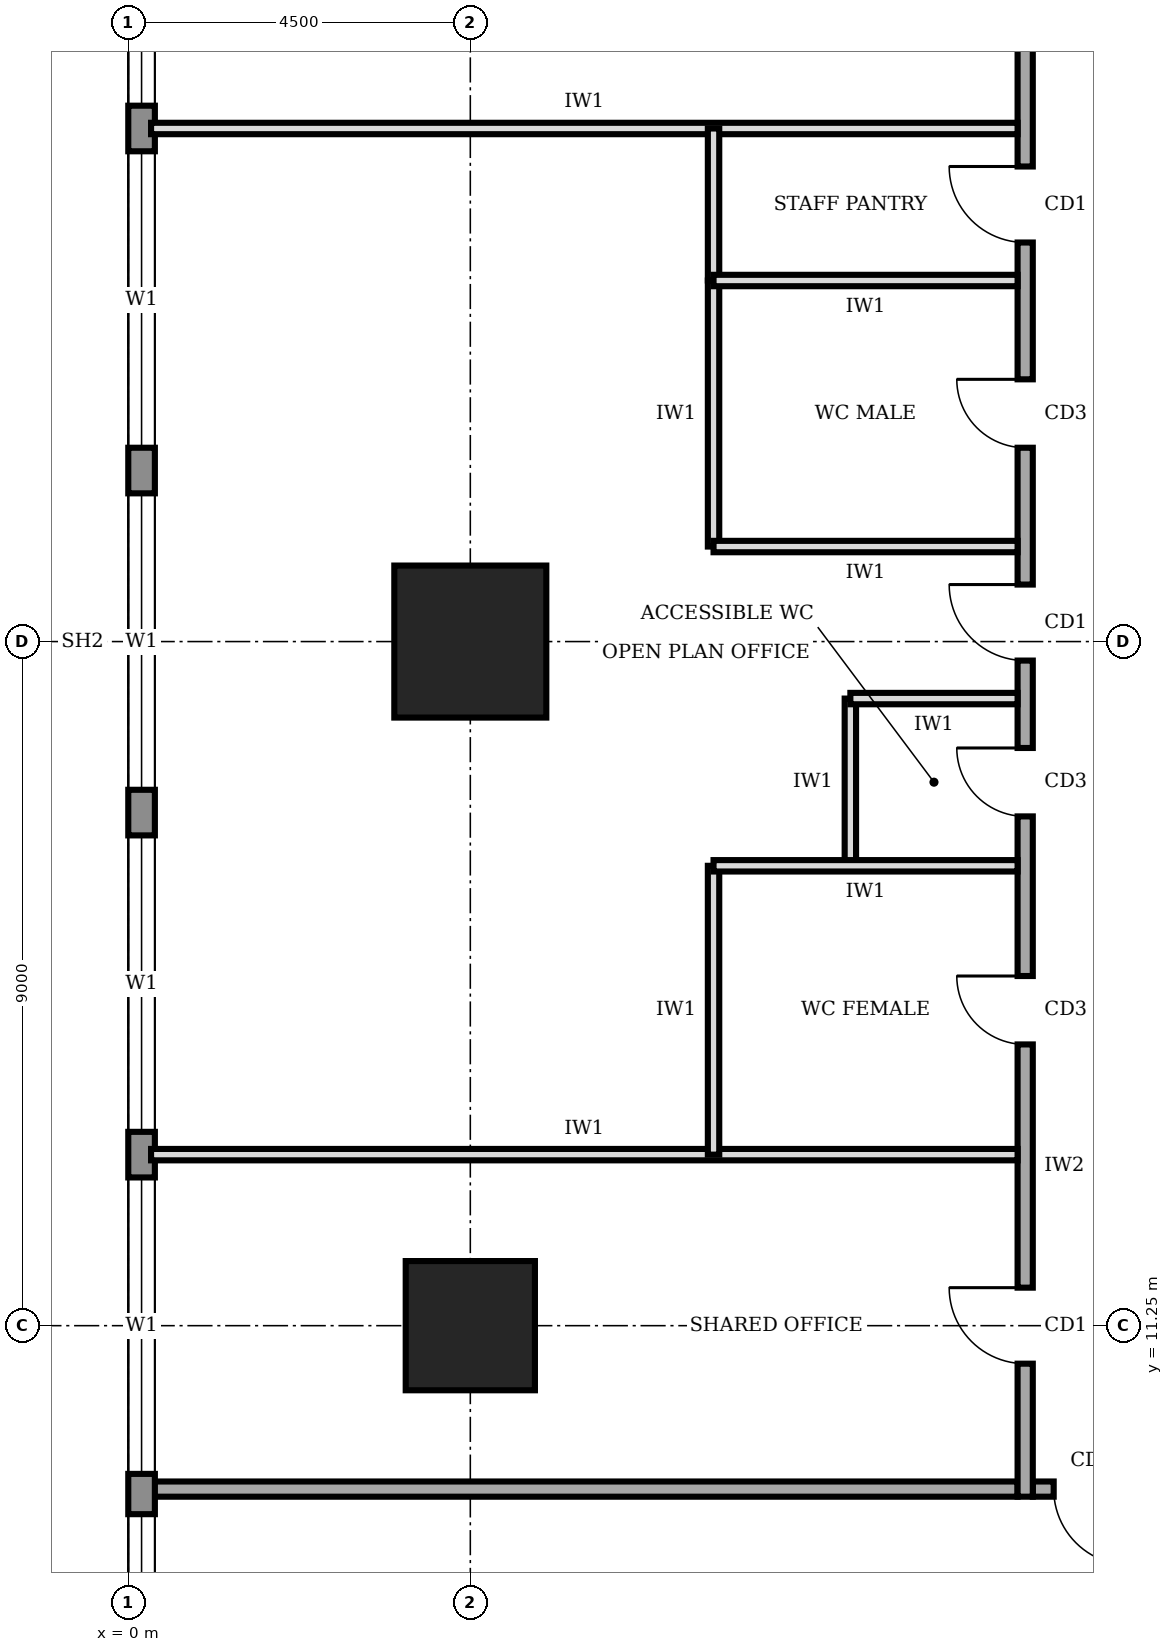
"""IFC4 building model, lengths in metres.
Left out: names, types, materials, properties, quantities, classifications, styles, units other than length and angle.
Written with IfcOpenShell. Run it as: python <this file> out.ifc"""

import sys

from ifc_helpers import new_model, si_unit, direction, frame, frame_2d, origin, origin_2d, place, context, subcontext, project, spatial, rectangle, extrude, element, fill, save


model = new_model("IFC4")
c1 = context("Model", 3, precision=1e-05, world=origin(), true_north=direction((0.0, 1.0)))
c2 = subcontext(c1, "Body", "Model", "MODEL_VIEW")
j1 = project(units=[si_unit("LENGTHUNIT", "METRE"), si_unit("PLANEANGLEUNIT", "RADIAN")], contexts=[c1])
p1 = place(None, origin())
s1 = spatial("IfcSite", under=j1, at=p1, CompositionType="ELEMENT")
p2 = place(p1, origin())
s2 = spatial("IfcBuilding", under=s1, at=p2, CompositionType="ELEMENT")
p3 = place(p2, frame((0.0, 0.0, 273.0)))
s3 = spatial("IfcBuildingStorey", under=s2, at=p3, CompositionType="ELEMENT", Elevation=273.0)
p4 = place(p3, frame((4.5, 11.25, 0.0), z_axis=(0.0, 0.0, 1.0), x_axis=(1.0, 0.0, 0.0)))
e1 = element("IfcColumn", 1, at=p4, inside=s3, PredefinedType="COLUMN", context=c2, shape_type="SweptSolid", body=[
    extrude(rectangle(XDim=1.7, YDim=1.7, at=origin_2d()), origin(), (0.0, 0.0, 1.0), 4.0),
])
p5 = place(p3, frame((4.5, 20.25, 0.0), z_axis=(0.0, 0.0, 1.0), x_axis=(1.0, 0.0, 0.0)))
e2 = element("IfcColumn", 2, at=p5, inside=s3, PredefinedType="COLUMN", context=c2, shape_type="SweptSolid", body=[
    extrude(rectangle(XDim=2.0, YDim=2.0, at=origin_2d()), origin(), (0.0, 0.0, 1.0), 4.0),
])
p6 = place(p3, frame((0.175, 35.98, 0.0), z_axis=(0.0, 0.0, 1.0), x_axis=(0.0, -1.0, 0.0)))
e3 = element("IfcWall", 3, at=p6, inside=s3, PredefinedType="STANDARD", context=c2, shape_type="SweptSolid", body=[
    extrude(rectangle(XDim=31.46, YDim=0.35, at=frame_2d((15.73, 0.0))), origin(), (0.0, 0.0, 1.0), 3.75),
])
p7 = place(p6, frame((27.21, 0.0, 0.9)))
e4 = element("IfcOpeningElement", 4, at=p7, cuts=e3, PredefinedType="OPENING", context=c2, shape_type="SweptSolid", body=[
    extrude(rectangle(XDim=3.9, YDim=2.2, at=frame_2d((1.95, 1.1))), frame((0.0, 0.185, 0.0), z_axis=(0.0, -1.0, 0.0), x_axis=(1.0, 0.0, 0.0)), (0.0, 0.0, 1.0), 0.37),
])
p8 = place(p6, frame((22.78, 0.0, 0.9)))
e5 = element("IfcOpeningElement", 5, at=p8, cuts=e3, PredefinedType="OPENING", context=c2, shape_type="SweptSolid", body=[
    extrude(rectangle(XDim=3.9, YDim=2.2, at=frame_2d((1.95, 1.1))), frame((0.0, 0.185, 0.0), z_axis=(0.0, -1.0, 0.0), x_axis=(1.0, 0.0, 0.0)), (0.0, 0.0, 1.0), 0.37),
])
p9 = place(p6, frame((18.28, 0.0, 0.9)))
e6 = element("IfcOpeningElement", 6, at=p9, cuts=e3, PredefinedType="OPENING", context=c2, shape_type="SweptSolid", body=[
    extrude(rectangle(XDim=3.9, YDim=2.2, at=frame_2d((1.95, 1.1))), frame((0.0, 0.185, 0.0), z_axis=(0.0, -1.0, 0.0), x_axis=(1.0, 0.0, 0.0)), (0.0, 0.0, 1.0), 0.37),
])
p10 = place(p6, frame((13.78, 0.0, 0.9)))
e7 = element("IfcOpeningElement", 7, at=p10, cuts=e3, PredefinedType="OPENING", context=c2, shape_type="SweptSolid", body=[
    extrude(rectangle(XDim=3.9, YDim=2.2, at=frame_2d((1.95, 1.1))), frame((0.0, 0.185, 0.0), z_axis=(0.0, -1.0, 0.0), x_axis=(1.0, 0.0, 0.0)), (0.0, 0.0, 1.0), 0.37),
])
p11 = place(p6, frame((9.28, 0.0, 0.9)))
e8 = element("IfcOpeningElement", 8, at=p11, cuts=e3, PredefinedType="OPENING", context=c2, shape_type="SweptSolid", body=[
    extrude(rectangle(XDim=3.9, YDim=2.2, at=frame_2d((1.95, 1.1))), frame((0.0, 0.185, 0.0), z_axis=(0.0, -1.0, 0.0), x_axis=(1.0, 0.0, 0.0)), (0.0, 0.0, 1.0), 0.37),
])
p12 = place(p6, frame((4.78, 0.0, 0.9)))
e9 = element("IfcOpeningElement", 9, at=p12, cuts=e3, PredefinedType="OPENING", context=c2, shape_type="SweptSolid", body=[
    extrude(rectangle(XDim=3.9, YDim=2.2, at=frame_2d((1.95, 1.1))), frame((0.0, 0.185, 0.0), z_axis=(0.0, -1.0, 0.0), x_axis=(1.0, 0.0, 0.0)), (0.0, 0.0, 1.0), 0.37),
])
p13 = place(p3, frame((11.9, 9.1, 0.0), z_axis=(0.0, 0.0, 1.0), x_axis=(1.0, 0.0, 0.0)))
e10 = element("IfcWall", 10, at=p13, inside=s3, PredefinedType="SOLIDWALL", context=c2, shape_type="SweptSolid", body=[
    extrude(rectangle(XDim=16.9, YDim=0.2, at=frame_2d((8.45, 0.0))), origin(), (0.0, 0.0, 1.0), 3.75),
])
p14 = place(p13, frame((0.275, 0.0, 0.0)))
e11 = element("IfcOpeningElement", 11, at=p14, cuts=e10, PredefinedType="OPENING", context=c2, shape_type="SweptSolid", body=[
    extrude(rectangle(XDim=1.0, YDim=2.1, at=frame_2d((0.5, 1.05))), frame((0.0, 0.11, 0.0), z_axis=(0.0, -1.0, 0.0), x_axis=(1.0, 0.0, 0.0)), (0.0, 0.0, 1.0), 0.22),
])
p15 = place(p13, frame((8.35, 0.0, 0.0)))
e12 = element("IfcOpeningElement", 12, at=p15, cuts=e10, PredefinedType="OPENING", context=c2, shape_type="SweptSolid", body=[
    extrude(rectangle(XDim=1.8, YDim=2.1, at=frame_2d((0.9, 1.05))), frame((0.0, 0.11, 0.0), z_axis=(0.0, -1.0, 0.0), x_axis=(1.0, 0.0, 0.0)), (0.0, 0.0, 1.0), 0.22),
])
p16 = place(p3, frame((11.8, 32.8, 0.0), z_axis=(0.0, 0.0, 1.0), x_axis=(0.0, -1.0, 0.0)))
e13 = element("IfcWall", 13, at=p16, inside=s3, PredefinedType="SOLIDWALL", context=c2, shape_type="SweptSolid", body=[
    extrude(rectangle(XDim=23.8, YDim=0.2, at=frame_2d((11.9, 0.0))), origin(), (0.0, 0.0, 1.0), 3.75),
])
p17 = place(p16, frame((21.05, 0.0, 0.0)))
e14 = element("IfcOpeningElement", 14, at=p17, cuts=e13, PredefinedType="OPENING", context=c2, shape_type="SweptSolid", body=[
    extrude(rectangle(XDim=1.0, YDim=2.1, at=frame_2d((0.5, 1.05))), frame((0.0, 0.11, 0.0), z_axis=(0.0, -1.0, 0.0), x_axis=(1.0, 0.0, 0.0)), (0.0, 0.0, 1.0), 0.22),
])
p18 = place(p16, frame((16.95, 0.0, 0.0)))
e15 = element("IfcOpeningElement", 15, at=p18, cuts=e13, PredefinedType="OPENING", context=c2, shape_type="SweptSolid", body=[
    extrude(rectangle(XDim=0.9, YDim=2.1, at=frame_2d((0.45, 1.05))), frame((0.0, 0.11, 0.0), z_axis=(0.0, -1.0, 0.0), x_axis=(1.0, 0.0, 0.0)), (0.0, 0.0, 1.0), 0.22),
])
p19 = place(p16, frame((13.95, 0.0, 0.0)))
e16 = element("IfcOpeningElement", 16, at=p19, cuts=e13, PredefinedType="OPENING", context=c2, shape_type="SweptSolid", body=[
    extrude(rectangle(XDim=0.9, YDim=2.1, at=frame_2d((0.45, 1.05))), frame((0.0, 0.11, 0.0), z_axis=(0.0, -1.0, 0.0), x_axis=(1.0, 0.0, 0.0)), (0.0, 0.0, 1.0), 0.22),
])
p20 = place(p16, frame((9.1, 0.0, 0.0)))
e17 = element("IfcOpeningElement", 17, at=p20, cuts=e13, PredefinedType="OPENING", context=c2, shape_type="SweptSolid", body=[
    extrude(rectangle(XDim=0.9, YDim=2.1, at=frame_2d((0.45, 1.05))), frame((0.0, 0.11, 0.0), z_axis=(0.0, -1.0, 0.0), x_axis=(1.0, 0.0, 0.0)), (0.0, 0.0, 1.0), 0.22),
])
p21 = place(p16, frame((6.3, 0.0, 0.0)))
e18 = element("IfcOpeningElement", 18, at=p21, cuts=e13, PredefinedType="OPENING", context=c2, shape_type="SweptSolid", body=[
    extrude(rectangle(XDim=1.0, YDim=2.1, at=frame_2d((0.5, 1.05))), frame((0.0, 0.11, 0.0), z_axis=(0.0, -1.0, 0.0), x_axis=(1.0, 0.0, 0.0)), (0.0, 0.0, 1.0), 0.22),
])
p22 = place(p16, frame((11.8, 0.0, 0.0)))
e19 = element("IfcOpeningElement", 19, at=p22, cuts=e13, PredefinedType="OPENING", context=c2, shape_type="SweptSolid", body=[
    extrude(rectangle(XDim=1.0, YDim=2.1, at=frame_2d((0.5, 1.05))), frame((0.0, 0.11, 0.0), z_axis=(0.0, -1.0, 0.0), x_axis=(1.0, 0.0, 0.0)), (0.0, 0.0, 1.0), 0.22),
])
p23 = place(p16, frame((2.3, 0.0, 0.0)))
e20 = element("IfcOpeningElement", 20, at=p23, cuts=e13, PredefinedType="OPENING", context=c2, shape_type="SweptSolid", body=[
    extrude(rectangle(XDim=1.0, YDim=2.1, at=frame_2d((0.5, 1.05))), frame((0.0, 0.11, 0.0), z_axis=(0.0, -1.0, 0.0), x_axis=(1.0, 0.0, 0.0)), (0.0, 0.0, 1.0), 0.22),
])
p24 = place(p3, frame((0.3, 9.1, 0.0), z_axis=(0.0, 0.0, 1.0), x_axis=(1.0, 0.0, 0.0)))
e21 = element("IfcWall", 21, at=p24, inside=s3, PredefinedType="SOLIDWALL", context=c2, shape_type="SweptSolid", body=[
    extrude(rectangle(XDim=11.4, YDim=0.2, at=frame_2d((5.7, 0.0))), origin(), (0.0, 0.0, 1.0), 3.75),
])
for number, where, z_axis, x_axis in (
    (22, (0.3, 13.5, 0.0), (0.0, 0.0, 1.0), (1.0, 0.0, 0.0)),
    (23, (0.3, 27.0, 0.0), (0.0, 0.0, 1.0), (1.0, 0.0, 0.0)),
):
    element("IfcWall", number, at=place(p3, frame(where, z_axis=z_axis, x_axis=x_axis)), inside=s3, PredefinedType="PARTITIONING", context=c2, shape_type="SweptSolid", body=[
        extrude(rectangle(XDim=11.4, YDim=0.15, at=frame_2d((5.7, 0.0))), origin(), (0.0, 0.0, 1.0), 3.75),
    ])
p25 = place(p3, frame((11.7, 17.3, 0.0), z_axis=(0.0, 0.0, 1.0), x_axis=(-1.0, 0.0, 0.0)))
e24 = element("IfcWall", 24, at=p25, inside=s3, PredefinedType="PARTITIONING", context=c2, shape_type="SweptSolid", body=[
    extrude(rectangle(XDim=4.0, YDim=0.15, at=frame_2d((2.0, 0.0))), origin(), (0.0, 0.0, 1.0), 3.75),
])
p26 = place(p3, frame((11.7, 19.5, 0.0), z_axis=(0.0, 0.0, 1.0), x_axis=(-1.0, 0.0, 0.0)))
e25 = element("IfcWall", 25, at=p26, inside=s3, PredefinedType="PARTITIONING", context=c2, shape_type="SweptSolid", body=[
    extrude(rectangle(XDim=2.2, YDim=0.15, at=frame_2d((1.1, 0.0))), origin(), (0.0, 0.0, 1.0), 2.85),
])
for number, where, z_axis, x_axis in (
    (26, (11.7, 21.5, 0.0), (0.0, 0.0, 1.0), (-1.0, 0.0, 0.0)),
    (27, (11.7, 25.0, 0.0), (0.0, 0.0, 1.0), (-1.0, 0.0, 0.0)),
):
    element("IfcWall", number, at=place(p3, frame(where, z_axis=z_axis, x_axis=x_axis)), inside=s3, PredefinedType="PARTITIONING", context=c2, shape_type="SweptSolid", body=[
        extrude(rectangle(XDim=4.0, YDim=0.15, at=frame_2d((2.0, 0.0))), origin(), (0.0, 0.0, 1.0), 3.75),
    ])
p27 = place(p3, frame((7.7, 13.5, 0.0), z_axis=(0.0, 0.0, 1.0), x_axis=(0.0, 1.0, 0.0)))
e28 = element("IfcWall", 28, at=p27, inside=s3, PredefinedType="PARTITIONING", context=c2, shape_type="SweptSolid", body=[
    extrude(rectangle(XDim=3.8, YDim=0.15, at=frame_2d((1.9, 0.0))), origin(), (0.0, 0.0, 1.0), 3.75),
])
p28 = place(p3, frame((9.5, 17.3, 0.0), z_axis=(0.0, 0.0, 1.0), x_axis=(0.0, 1.0, 0.0)))
e29 = element("IfcWall", 29, at=p28, inside=s3, PredefinedType="PARTITIONING", context=c2, shape_type="SweptSolid", body=[
    extrude(rectangle(XDim=2.2, YDim=0.15, at=frame_2d((1.1, 0.0))), origin(), (0.0, 0.0, 1.0), 3.75),
])
p29 = place(p3, frame((7.7, 21.5, 0.0), z_axis=(0.0, 0.0, 1.0), x_axis=(0.0, 1.0, 0.0)))
e30 = element("IfcWall", 30, at=p29, inside=s3, PredefinedType="PARTITIONING", context=c2, shape_type="SweptSolid", body=[
    extrude(rectangle(XDim=3.5, YDim=0.15, at=frame_2d((1.75, 0.0))), origin(), (0.0, 0.0, 1.0), 3.75),
])
p30 = place(p3, frame((7.7, 25.0, 0.0), z_axis=(0.0, 0.0, 1.0), x_axis=(0.0, 1.0, 0.0)))
e31 = element("IfcWall", 31, at=p30, inside=s3, PredefinedType="PARTITIONING", context=c2, shape_type="SweptSolid", body=[
    extrude(rectangle(XDim=2.0, YDim=0.15, at=frame_2d((1.0, 0.0))), origin(), (0.0, 0.0, 1.0), 3.75),
])
p31 = place(p7, origin())
e32 = element("IfcWindow", 32, at=p31, inside=s3, PartitioningType="SINGLE_PANEL", PredefinedType="WINDOW", context=c2, shape_type="SweptSolid", body=[
    extrude(rectangle(XDim=3.9, YDim=2.2, at=frame_2d((1.95, 1.1))), frame((0.0, 0.03, 0.0), z_axis=(0.0, -1.0, 0.0), x_axis=(1.0, 0.0, 0.0)), (0.0, 0.0, 1.0), 0.06),
])
fill(e4, e32)
p32 = place(p8, origin())
e33 = element("IfcWindow", 33, at=p32, inside=s3, PartitioningType="SINGLE_PANEL", PredefinedType="WINDOW", context=c2, shape_type="SweptSolid", body=[
    extrude(rectangle(XDim=3.9, YDim=2.2, at=frame_2d((1.95, 1.1))), frame((0.0, 0.03, 0.0), z_axis=(0.0, -1.0, 0.0), x_axis=(1.0, 0.0, 0.0)), (0.0, 0.0, 1.0), 0.06),
])
fill(e5, e33)
p33 = place(p9, origin())
e34 = element("IfcWindow", 34, at=p33, inside=s3, PartitioningType="SINGLE_PANEL", PredefinedType="WINDOW", context=c2, shape_type="SweptSolid", body=[
    extrude(rectangle(XDim=3.9, YDim=2.2, at=frame_2d((1.95, 1.1))), frame((0.0, 0.03, 0.0), z_axis=(0.0, -1.0, 0.0), x_axis=(1.0, 0.0, 0.0)), (0.0, 0.0, 1.0), 0.06),
])
fill(e6, e34)
p34 = place(p10, origin())
e35 = element("IfcWindow", 35, at=p34, inside=s3, PartitioningType="SINGLE_PANEL", PredefinedType="WINDOW", context=c2, shape_type="SweptSolid", body=[
    extrude(rectangle(XDim=3.9, YDim=2.2, at=frame_2d((1.95, 1.1))), frame((0.0, 0.03, 0.0), z_axis=(0.0, -1.0, 0.0), x_axis=(1.0, 0.0, 0.0)), (0.0, 0.0, 1.0), 0.06),
])
fill(e7, e35)
p35 = place(p11, origin())
e36 = element("IfcWindow", 36, at=p35, inside=s3, PartitioningType="SINGLE_PANEL", PredefinedType="WINDOW", context=c2, shape_type="SweptSolid", body=[
    extrude(rectangle(XDim=3.9, YDim=2.2, at=frame_2d((1.95, 1.1))), frame((0.0, 0.03, 0.0), z_axis=(0.0, -1.0, 0.0), x_axis=(1.0, 0.0, 0.0)), (0.0, 0.0, 1.0), 0.06),
])
fill(e8, e36)
p36 = place(p12, origin())
e37 = element("IfcWindow", 37, at=p36, inside=s3, PartitioningType="SINGLE_PANEL", PredefinedType="WINDOW", context=c2, shape_type="SweptSolid", body=[
    extrude(rectangle(XDim=3.9, YDim=2.2, at=frame_2d((1.95, 1.1))), frame((0.0, 0.03, 0.0), z_axis=(0.0, -1.0, 0.0), x_axis=(1.0, 0.0, 0.0)), (0.0, 0.0, 1.0), 0.06),
])
fill(e9, e37)
p37 = place(p14, frame((1.0, 0.0, 0.0), z_axis=(0.0, 0.0, 1.0), x_axis=(-1.0, 0.0, 0.0)))
e38 = element("IfcDoor", 38, at=p37, inside=s3, OperationType="SINGLE_SWING_LEFT", PredefinedType="DOOR", context=c2, shape_type="SweptSolid", body=[
    extrude(rectangle(XDim=1.0, YDim=2.1, at=frame_2d((0.5, 1.05))), frame((0.0, 0.025, 0.0), z_axis=(0.0, -1.0, 0.0), x_axis=(1.0, 0.0, 0.0)), (0.0, 0.0, 1.0), 0.05),
])
fill(e11, e38)
p38 = place(p17, frame((1.0, 0.0, 0.0), z_axis=(0.0, 0.0, 1.0), x_axis=(-1.0, 0.0, 0.0)))
e39 = element("IfcDoor", 39, at=p38, inside=s3, OperationType="SINGLE_SWING_RIGHT", PredefinedType="DOOR", context=c2, shape_type="SweptSolid", body=[
    extrude(rectangle(XDim=1.0, YDim=2.1, at=frame_2d((0.5, 1.05))), frame((0.0, 0.025, 0.0), z_axis=(0.0, -1.0, 0.0), x_axis=(1.0, 0.0, 0.0)), (0.0, 0.0, 1.0), 0.05),
])
fill(e14, e39)
p39 = place(p18, frame((0.9, 0.0, 0.0), z_axis=(0.0, 0.0, 1.0), x_axis=(-1.0, 0.0, 0.0)))
e40 = element("IfcDoor", 40, at=p39, inside=s3, OperationType="SINGLE_SWING_RIGHT", PredefinedType="DOOR", context=c2, shape_type="SweptSolid", body=[
    extrude(rectangle(XDim=0.9, YDim=2.1, at=frame_2d((0.45, 1.05))), frame((0.0, 0.025, 0.0), z_axis=(0.0, -1.0, 0.0), x_axis=(1.0, 0.0, 0.0)), (0.0, 0.0, 1.0), 0.05),
])
fill(e15, e40)
p40 = place(p19, frame((0.9, 0.0, 0.0), z_axis=(0.0, 0.0, 1.0), x_axis=(-1.0, 0.0, 0.0)))
e41 = element("IfcDoor", 41, at=p40, inside=s3, OperationType="SINGLE_SWING_RIGHT", PredefinedType="DOOR", context=c2, shape_type="SweptSolid", body=[
    extrude(rectangle(XDim=0.9, YDim=2.1, at=frame_2d((0.45, 1.05))), frame((0.0, 0.025, 0.0), z_axis=(0.0, -1.0, 0.0), x_axis=(1.0, 0.0, 0.0)), (0.0, 0.0, 1.0), 0.05),
])
fill(e16, e41)
p41 = place(p20, frame((0.9, 0.0, 0.0), z_axis=(0.0, 0.0, 1.0), x_axis=(-1.0, 0.0, 0.0)))
e42 = element("IfcDoor", 42, at=p41, inside=s3, OperationType="SINGLE_SWING_RIGHT", PredefinedType="DOOR", context=c2, shape_type="SweptSolid", body=[
    extrude(rectangle(XDim=0.9, YDim=2.1, at=frame_2d((0.45, 1.05))), frame((0.0, 0.025, 0.0), z_axis=(0.0, -1.0, 0.0), x_axis=(1.0, 0.0, 0.0)), (0.0, 0.0, 1.0), 0.05),
])
fill(e17, e42)
p42 = place(p21, frame((1.0, 0.0, 0.0), z_axis=(0.0, 0.0, 1.0), x_axis=(-1.0, 0.0, 0.0)))
e43 = element("IfcDoor", 43, at=p42, inside=s3, OperationType="SINGLE_SWING_RIGHT", PredefinedType="DOOR", context=c2, shape_type="SweptSolid", body=[
    extrude(rectangle(XDim=1.0, YDim=2.1, at=frame_2d((0.5, 1.05))), frame((0.0, 0.025, 0.0), z_axis=(0.0, -1.0, 0.0), x_axis=(1.0, 0.0, 0.0)), (0.0, 0.0, 1.0), 0.05),
])
fill(e18, e43)
p43 = place(p22, frame((1.0, 0.0, 0.0), z_axis=(0.0, 0.0, 1.0), x_axis=(-1.0, 0.0, 0.0)))
e44 = element("IfcDoor", 44, at=p43, inside=s3, OperationType="SINGLE_SWING_RIGHT", PredefinedType="DOOR", context=c2, shape_type="SweptSolid", body=[
    extrude(rectangle(XDim=1.0, YDim=2.1, at=frame_2d((0.5, 1.05))), frame((0.0, 0.025, 0.0), z_axis=(0.0, -1.0, 0.0), x_axis=(1.0, 0.0, 0.0)), (0.0, 0.0, 1.0), 0.05),
])
fill(e19, e44)
save(model, sys.argv[1])
